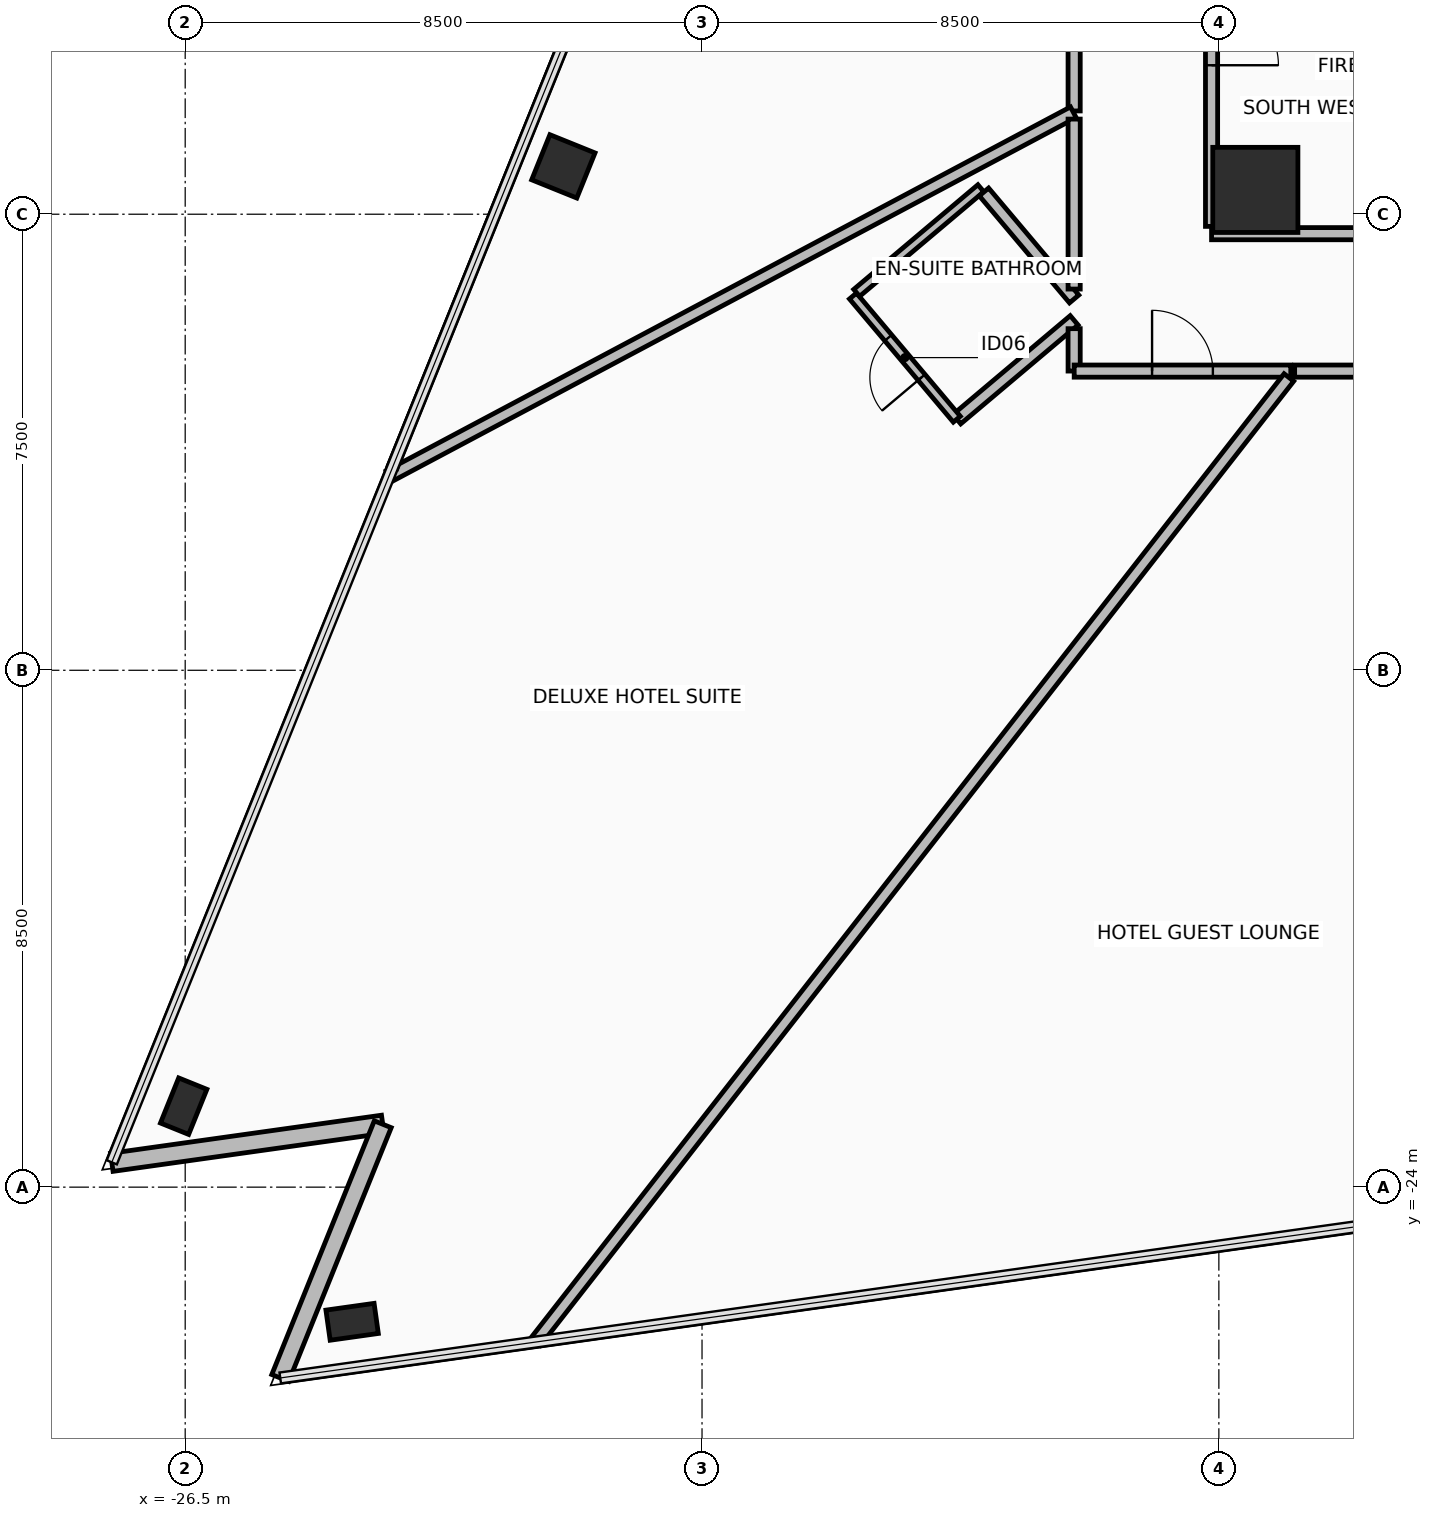
"""IFC4 building model, lengths in metres.
Left out: names, types, materials, properties, quantities, classifications, styles, units other than length and angle.
Written with IfcOpenShell. Run it as: python <this file> out.ifc"""

import sys

from ifc_helpers import new_model, si_unit, direction, frame, frame_2d, origin, origin_2d, place, context, subcontext, project, spatial, rectangle, hollow_rectangle, extrude, element, fill, save


model = new_model("IFC4")
c1 = context("Model", 3, precision=1e-05, world=origin(), true_north=direction((0.0, 1.0)))
c2 = subcontext(c1, "Body", "Model", "MODEL_VIEW")
j1 = project(units=[si_unit("LENGTHUNIT", "METRE"), si_unit("PLANEANGLEUNIT", "RADIAN")], contexts=[c1])
p1 = place(None, origin())
s1 = spatial("IfcSite", under=j1, at=p1, CompositionType="ELEMENT")
p2 = place(p1, origin())
s2 = spatial("IfcBuilding", under=s1, at=p2, CompositionType="ELEMENT")
p3 = place(p2, frame((0.0, 0.0, 57.0)))
s3 = spatial("IfcBuildingStorey", under=s2, at=p3, CompositionType="ELEMENT", Elevation=57.0)
p4 = place(p3, frame((-8.9, -7.6, 0.0), z_axis=(0.0, 0.0, 1.0), x_axis=(1.0, 0.0, 0.0)))
e1 = element("IfcColumn", 1, at=p4, inside=s3, PredefinedType="COLUMN", context=c2, shape_type="SweptSolid", body=[
    extrude(rectangle(XDim=1.4, YDim=1.4, at=origin_2d()), origin(), (0.0, 0.0, 1.0), 3.45),
])
p5 = place(p3, frame((-20.281, -7.213, 0.0), z_axis=(0.0, 0.0, 1.0), x_axis=(0.374608211656, 0.927183200754, 0.0)))
e2 = element("IfcColumn", 2, at=p5, inside=s3, PredefinedType="COLUMN", context=c2, shape_type="SweptSolid", body=[
    extrude(hollow_rectangle(XDim=0.8, YDim=0.8, WallThickness=0.045, at=origin_2d()), origin(), (0.0, 0.0, 1.0), 3.45),
])
for number, where, z_axis, x_axis in (
    (3, (-26.525, -22.668, 0.0), (0.0, 0.0, 1.0), (0.375, 0.927, 0.0)),
    (4, (-23.755, -26.214, 0.0), (0.0, 0.0, 1.0), (0.99, 0.139, 0.0)),
):
    element("IfcColumn", number, at=place(p3, frame(where, z_axis=z_axis, x_axis=x_axis)), inside=s3, PredefinedType="COLUMN", context=c2, shape_type="SweptSolid", body=[
        extrude(hollow_rectangle(XDim=0.5, YDim=0.8, WallThickness=0.04, at=origin_2d()), origin(), (0.0, 0.0, 1.0), 3.45),
    ])
p6 = place(p3, frame((-27.707, -23.592, 0.0), z_axis=(0.0, 0.0, 1.0), x_axis=(0.990269200152, 0.139165050317, 0.0)))
e5 = element("IfcWall", 5, at=p6, inside=s3, PredefinedType="STANDARD", context=c2, shape_type="SweptSolid", body=[
    extrude(rectangle(XDim=4.5, YDim=0.3, at=frame_2d((2.25, 0.0))), origin(), (0.0, 0.0, 1.0), 2.47),
])
p7 = place(p3, frame((-23.251, -22.966, 0.0), z_axis=(0.0, 0.0, 1.0), x_axis=(-0.374568898324, -0.927199083481, 0.0)))
e6 = element("IfcWall", 6, at=p7, inside=s3, PredefinedType="STANDARD", context=c2, shape_type="SweptSolid", body=[
    extrude(rectangle(XDim=4.5, YDim=0.3, at=frame_2d((2.25, 0.0))), origin(), (0.0, 0.0, 1.0), 2.47),
])
p8 = place(p3, frame((-9.62, -8.32, 0.0), z_axis=(0.0, 0.0, 1.0), x_axis=(1.0, 0.0, 0.0)))
e7 = element("IfcWall", 7, at=p8, inside=s3, PredefinedType="PARTITIONING", context=c2, shape_type="SweptSolid", body=[
    extrude(rectangle(XDim=19.24, YDim=0.2, at=frame_2d((9.62, 0.0))), origin(), (0.0, 0.0, 1.0), 2.67),
])
p9 = place(p8, frame((14.045, 0.0, 0.0)))
e8 = element("IfcOpeningElement", 8, at=p9, cuts=e7, PredefinedType="OPENING", context=c2, shape_type="SweptSolid", body=[
    extrude(rectangle(XDim=0.9, YDim=2.1, at=frame_2d((0.45, 1.05))), frame((0.0, 0.11, 0.0), z_axis=(0.0, -1.0, 0.0), x_axis=(1.0, 0.0, 0.0)), (0.0, 0.0, 1.0), 0.22),
])
p10 = place(p8, frame((15.995, 0.0, 0.0)))
e9 = element("IfcOpeningElement", 9, at=p10, cuts=e7, PredefinedType="OPENING", context=c2, shape_type="SweptSolid", body=[
    extrude(rectangle(XDim=0.9, YDim=2.1, at=frame_2d((0.45, 1.05))), frame((0.0, 0.11, 0.0), z_axis=(0.0, -1.0, 0.0), x_axis=(1.0, 0.0, 0.0)), (0.0, 0.0, 1.0), 0.22),
])
p11 = place(p3, frame((-9.62, 8.2, 0.0), z_axis=(0.0, 0.0, 1.0), x_axis=(0.0, -1.0, 0.0)))
e10 = element("IfcWall", 10, at=p11, inside=s3, PredefinedType="PARTITIONING", context=c2, shape_type="SweptSolid", body=[
    extrude(rectangle(XDim=16.4, YDim=0.2, at=frame_2d((8.2, 0.0))), origin(), (0.0, 0.0, 1.0), 2.67),
])
p12 = place(p11, frame((12.65, 0.0, 0.0)))
e11 = element("IfcOpeningElement", 11, at=p12, cuts=e10, PredefinedType="OPENING", context=c2, shape_type="SweptSolid", body=[
    extrude(rectangle(XDim=1.1, YDim=2.15, at=frame_2d((0.55, 1.075))), frame((0.0, 0.11, 0.0), z_axis=(0.0, -1.0, 0.0), x_axis=(1.0, 0.0, 0.0)), (0.0, 0.0, 1.0), 0.22),
])
p13 = place(p3, frame((-11.88, -9.745, 0.0), z_axis=(0.0, 0.0, 1.0), x_axis=(-0.764712982519, -0.644371053328, 0.0)))
e12 = element("IfcWall", 12, at=p13, inside=s3, PredefinedType="PARTITIONING", context=c2, shape_type="SweptSolid", body=[
    extrude(rectangle(XDim=2.524, YDim=0.2, at=frame_2d((1.262, 0.0))), origin(), (0.0, 0.0, 1.0), 3.275),
])
p14 = place(p3, frame((-13.81, -11.371, 0.0), z_axis=(0.0, 0.0, 1.0), x_axis=(-0.644478981733, 0.764622025647, 0.0)))
e13 = element("IfcWall", 13, at=p14, inside=s3, PredefinedType="PARTITIONING", context=c2, shape_type="SweptSolid", body=[
    extrude(rectangle(XDim=2.65, YDim=0.15, at=frame_2d((1.325, 0.0))), origin(), (0.0, 0.0, 1.0), 2.87),
])
p15 = place(p14, frame((0.9, 0.0, 0.0)))
e14 = element("IfcOpeningElement", 14, at=p15, cuts=e13, PredefinedType="OPENING", context=c2, shape_type="SweptSolid", body=[
    extrude(rectangle(XDim=0.85, YDim=2.1, at=frame_2d((0.425, 1.05))), frame((0.0, 0.085, 0.0), z_axis=(0.0, -1.0, 0.0), x_axis=(1.0, 0.0, 0.0)), (0.0, 0.0, 1.0), 0.17),
])
p16 = place(p3, frame((-15.456, -9.293, 0.0), z_axis=(0.0, 0.0, 1.0), x_axis=(0.764709608169, 0.644375057846, 0.0)))
e15 = element("IfcWall", 15, at=p16, inside=s3, PredefinedType="PARTITIONING", context=c2, shape_type="SweptSolid", body=[
    extrude(rectangle(XDim=2.67, YDim=0.15, at=frame_2d((1.335, 0.0))), origin(), (0.0, 0.0, 1.0), 2.67),
])
p17 = place(p3, frame((-13.363, -7.634, 0.0), z_axis=(0.0, 0.0, 1.0), x_axis=(0.644400290836, -0.764688345125, 0.0)))
e16 = element("IfcWall", 16, at=p17, inside=s3, PredefinedType="PARTITIONING", context=c2, shape_type="SweptSolid", body=[
    extrude(rectangle(XDim=2.302, YDim=0.2, at=frame_2d((1.151, 0.0))), origin(), (0.0, 0.0, 1.0), 2.67),
])
p18 = place(p3, frame((-11.88, -0.857, 0.0), z_axis=(0.0, 0.0, 1.0), x_axis=(0.0, -1.0, 0.0)))
e17 = element("IfcWall", 17, at=p18, inside=s3, PredefinedType="PARTITIONING", context=c2, shape_type="SweptSolid", body=[
    extrude(rectangle(XDim=5.444, YDim=0.2, at=frame_2d((2.722, 0.0))), origin(), (0.0, 0.0, 1.0), 3.275),
])
p19 = place(p18, frame((2.297, 0.0, 0.0)))
e18 = element("IfcOpeningElement", 18, at=p19, cuts=e17, PredefinedType="OPENING", context=c2, shape_type="SweptSolid", body=[
    extrude(rectangle(XDim=0.85, YDim=2.1, at=frame_2d((0.425, 1.05))), frame((0.0, 0.11, 0.0), z_axis=(0.0, -1.0, 0.0), x_axis=(1.0, 0.0, 0.0)), (0.0, 0.0, 1.0), 0.22),
])
p20 = place(p3, frame((-11.893, -6.324, 0.0), z_axis=(0.0, 0.0, 1.0), x_axis=(-0.882946043117, -0.469474477416, 0.0)))
e19 = element("IfcWall", 19, at=p20, inside=s3, PredefinedType="PARTITIONING", context=c2, shape_type="SweptSolid", body=[
    extrude(rectangle(XDim=12.747, YDim=0.2, at=frame_2d((6.374, 0.0))), origin(), (0.0, 0.0, 1.0), 2.47),
])
p21 = place(p3, frame((-23.087, -12.156, 0.0), z_axis=(0.0, 0.0, 1.0), x_axis=(0.374605375648, 0.927184346576, 0.0)))
e20 = element("IfcWall", 20, at=p21, inside=s3, PredefinedType="PARTITIONING", context=c2, shape_type="SweptSolid", body=[
    extrude(rectangle(XDim=11.685, YDim=0.15, at=frame_2d((5.842, 0.0))), origin(), (0.0, 0.0, 1.0), 3.275),
])
p22 = place(p3, frame((-11.88, -6.436, 0.0), z_axis=(0.0, 0.0, 1.0), x_axis=(0.0, -1.0, 0.0)))
e21 = element("IfcWall", 21, at=p22, inside=s3, PredefinedType="PARTITIONING", context=c2, shape_type="SweptSolid", body=[
    extrude(rectangle(XDim=2.795, YDim=0.2, at=frame_2d((1.397, 0.0))), origin(), (0.0, 0.0, 1.0), 2.67),
])
p23 = place(p3, frame((-11.88, -9.882, 0.0), z_axis=(0.0, 0.0, 1.0), x_axis=(0.0, -1.0, 0.0)))
e22 = element("IfcWall", 22, at=p23, inside=s3, PredefinedType="PARTITIONING", context=c2, shape_type="SweptSolid", body=[
    extrude(rectangle(XDim=0.697, YDim=0.2, at=frame_2d((0.349, 0.0))), origin(), (0.0, 0.0, 1.0), 2.67),
])
p24 = place(p3, frame((-11.879, -10.58, 0.0), z_axis=(0.0, 0.0, 1.0), x_axis=(1.0, 0.0, 0.0)))
e23 = element("IfcWall", 23, at=p24, inside=s3, PredefinedType="PARTITIONING", context=c2, shape_type="SweptSolid", body=[
    extrude(rectangle(XDim=3.562, YDim=0.2, at=frame_2d((1.781, 0.0))), origin(), (0.0, 0.0, 1.0), 2.67),
])
p25 = place(p24, frame((1.281, 0.0, 0.0)))
e24 = element("IfcOpeningElement", 24, at=p25, cuts=e23, PredefinedType="OPENING", context=c2, shape_type="SweptSolid", body=[
    extrude(rectangle(XDim=1.0, YDim=2.15, at=frame_2d((0.5, 1.075))), frame((0.0, 0.11, 0.0), z_axis=(0.0, -1.0, 0.0), x_axis=(1.0, 0.0, 0.0)), (0.0, 0.0, 1.0), 0.22),
])
p26 = place(p3, frame((-8.348, -10.685, 0.0), z_axis=(0.0, 0.0, 1.0), x_axis=(-0.615661230884, -0.788010944585, 0.0)))
e25 = element("IfcWall", 25, at=p26, inside=s3, PredefinedType="PARTITIONING", context=c2, shape_type="SweptSolid", body=[
    extrude(rectangle(XDim=20.121, YDim=0.2, at=frame_2d((10.06, 0.0))), origin(), (0.0, 0.0, 1.0), 2.47),
])
p27 = place(p3, frame((-8.254, -10.58, 0.0), z_axis=(0.0, 0.0, 1.0), x_axis=(1.0, 0.0, 0.0)))
e26 = element("IfcWall", 26, at=p27, inside=s3, PredefinedType="PARTITIONING", context=c2, shape_type="SweptSolid", body=[
    extrude(rectangle(XDim=5.584, YDim=0.2, at=frame_2d((2.792, 0.0))), origin(), (0.0, 0.0, 1.0), 2.67),
])
p28 = place(p27, frame((2.192, 0.0, 0.0)))
e27 = element("IfcOpeningElement", 27, at=p28, cuts=e26, PredefinedType="OPENING", context=c2, shape_type="SweptSolid", body=[
    extrude(rectangle(XDim=1.2, YDim=2.15, at=frame_2d((0.6, 1.075))), frame((0.0, 0.11, 0.0), z_axis=(0.0, -1.0, 0.0), x_axis=(1.0, 0.0, 0.0)), (0.0, 0.0, 1.0), 0.22),
])
p29 = place(p12, frame((1.1, 0.0, 0.0), z_axis=(0.0, 0.0, 1.0), x_axis=(-1.0, 0.0, 0.0)))
e28 = element("IfcDoor", 28, at=p29, inside=s3, OperationType="SINGLE_SWING_LEFT", PredefinedType="DOOR", context=c2, shape_type="SweptSolid", body=[
    extrude(rectangle(XDim=1.1, YDim=2.15, at=frame_2d((0.55, 1.075))), frame((0.0, 0.025, 0.0), z_axis=(0.0, -1.0, 0.0), x_axis=(1.0, 0.0, 0.0)), (0.0, 0.0, 1.0), 0.05),
])
fill(e11, e28)
p30 = place(p15, origin())
e29 = element("IfcDoor", 29, at=p30, inside=s3, OperationType="SINGLE_SWING_RIGHT", PredefinedType="DOOR", context=c2, shape_type="SweptSolid", body=[
    extrude(rectangle(XDim=0.85, YDim=2.1, at=frame_2d((0.425, 1.05))), frame((0.0, 0.025, 0.0), z_axis=(0.0, -1.0, 0.0), x_axis=(1.0, 0.0, 0.0)), (0.0, 0.0, 1.0), 0.05),
])
fill(e14, e29)
p31 = place(p25, origin())
e30 = element("IfcDoor", 30, at=p31, inside=s3, OperationType="SINGLE_SWING_LEFT", PredefinedType="DOOR", context=c2, shape_type="SweptSolid", body=[
    extrude(rectangle(XDim=1.0, YDim=2.15, at=frame_2d((0.5, 1.075))), frame((0.0, 0.025, 0.0), z_axis=(0.0, -1.0, 0.0), x_axis=(1.0, 0.0, 0.0)), (0.0, 0.0, 1.0), 0.05),
])
fill(e24, e30)
save(model, sys.argv[1])
